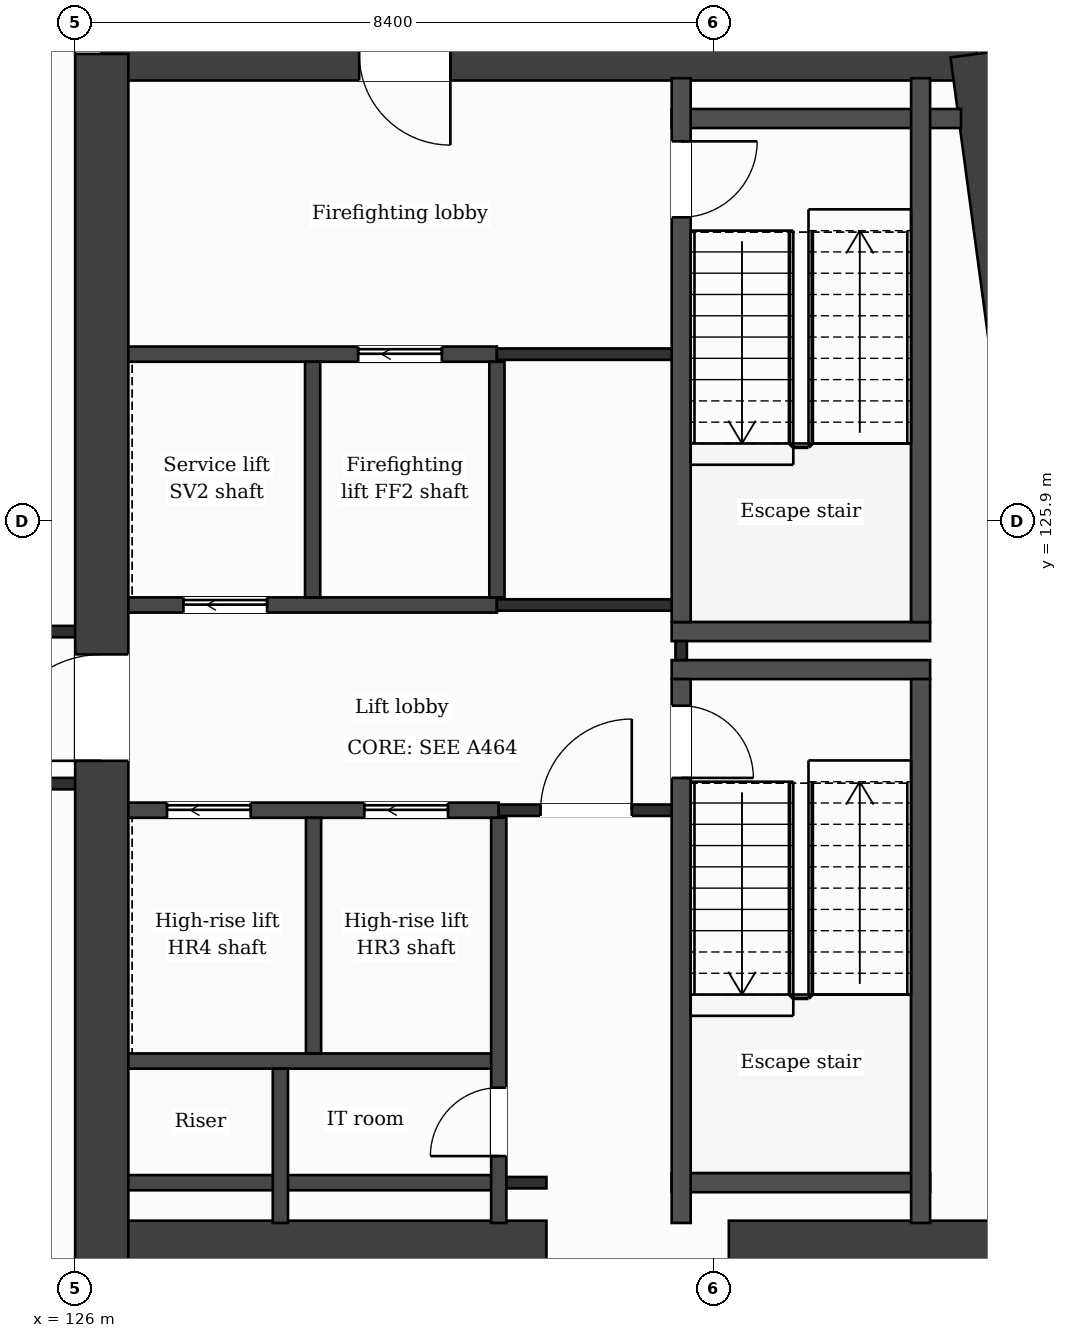
"""IFC4 building model, lengths in metres.
Left out: names, types, materials, properties, quantities, classifications, styles, units other than length and angle.
Written with IfcOpenShell. Run it as: python <this file> out.ifc"""

import sys

from ifc_helpers import new_model, si_unit, direction, frame, frame_2d, origin, place, context, subcontext, project, spatial, rectangle, extrude, element, fill, save


model = new_model("IFC4")
c1 = context("Model", 3, precision=1e-05, world=origin(), true_north=direction((0.0, 1.0)))
c2 = subcontext(c1, "Body", "Model", "MODEL_VIEW")
j1 = project(units=[si_unit("LENGTHUNIT", "METRE"), si_unit("PLANEANGLEUNIT", "RADIAN")], contexts=[c1])
p1 = place(None, origin())
s1 = spatial("IfcSite", under=j1, at=p1, CompositionType="ELEMENT")
p2 = place(p1, origin())
s2 = spatial("IfcBuilding", under=s1, at=p2, CompositionType="ELEMENT")
p3 = place(p2, frame((0.0, 0.0, 262.7)))
s3 = spatial("IfcBuildingStorey", under=s2, at=p3, CompositionType="ELEMENT", Elevation=262.7)
p4 = place(p3, frame((126.35, 132.05, 0.0), z_axis=(0.0, 0.0, 1.0), x_axis=(1.0, 0.0, 0.0)))
e1 = element("IfcWall", 1, at=p4, inside=s3, PredefinedType="SHEAR", context=c2, shape_type="SweptSolid", body=[
    extrude(rectangle(XDim=11.513, YDim=0.7, at=frame_2d((5.757, 0.0))), origin(), (0.0, 0.0, 1.0), 3.7),
])
p5 = place(p4, frame((3.386, 0.0, 0.0)))
e2 = element("IfcOpeningElement", 2, at=p5, cuts=e1, PredefinedType="OPENING", context=c2, shape_type="SweptSolid", body=[
    extrude(rectangle(XDim=1.2, YDim=2.1, at=frame_2d((0.6, 1.05))), frame((0.0, 0.36, 0.0), z_axis=(0.0, -1.0, 0.0), x_axis=(1.0, 0.0, 0.0)), (0.0, 0.0, 1.0), 0.72),
])
p6 = place(p3, frame((137.863, 132.05, 0.0), z_axis=(0.0, 0.0, 1.0), x_axis=(0.133406218907, -0.991061441464, 0.0)))
e3 = element("IfcWall", 3, at=p6, inside=s3, PredefinedType="SHEAR", context=c2, shape_type="SweptSolid", body=[
    extrude(rectangle(XDim=21.492, YDim=0.7, at=frame_2d((10.746, 0.0))), origin(), (0.0, 0.0, 1.0), 3.7),
])
p7 = place(p3, frame((126.35, 110.75, 0.0), z_axis=(0.0, 0.0, 1.0), x_axis=(0.0, 1.0, 0.0)))
e4 = element("IfcWall", 4, at=p7, inside=s3, PredefinedType="SHEAR", context=c2, shape_type="SweptSolid", body=[
    extrude(rectangle(XDim=21.3, YDim=0.7, at=frame_2d((10.65, 0.0))), origin(), (0.0, 0.0, 1.0), 3.7),
])
p8 = place(p7, frame((12.0, 0.0, 0.0)))
e5 = element("IfcOpeningElement", 5, at=p8, cuts=e4, PredefinedType="OPENING", context=c2, shape_type="SweptSolid", body=[
    extrude(rectangle(XDim=1.4, YDim=2.1, at=frame_2d((0.7, 1.05))), frame((0.0, 0.36, 0.0), z_axis=(0.0, -1.0, 0.0), x_axis=(1.0, 0.0, 0.0)), (0.0, 0.0, 1.0), 0.72),
])
p9 = place(p3, frame((126.7, 116.35, 0.0), z_axis=(0.0, 0.0, 1.0), x_axis=(1.0, 0.0, 0.0)))
e6 = element("IfcWall", 6, at=p9, inside=s3, PredefinedType="SHEAR", context=c2, shape_type="SweptSolid", body=[
    extrude(rectangle(XDim=5.5, YDim=0.7, at=frame_2d((2.75, 0.0))), origin(), (0.0, 0.0, 1.0), 3.7),
])
p10 = place(p3, frame((134.6, 116.35, 0.0), z_axis=(0.0, 0.0, 1.0), x_axis=(1.0, 0.0, 0.0)))
e7 = element("IfcWall", 7, at=p10, inside=s3, PredefinedType="SHEAR", context=c2, shape_type="SweptSolid", body=[
    extrude(rectangle(XDim=5.077, YDim=0.7, at=frame_2d((2.539, 0.0))), origin(), (0.0, 0.0, 1.0), 3.7),
])
p11 = place(p3, frame((126.7, 117.2, 0.0), z_axis=(0.0, 0.0, 1.0), x_axis=(1.0, 0.0, 0.0)))
e8 = element("IfcWall", 8, at=p11, inside=s3, PredefinedType="PARTITIONING", context=c2, shape_type="SweptSolid", body=[
    extrude(rectangle(XDim=4.873, YDim=0.2, at=frame_2d((2.437, 0.0))), origin(), (0.0, 0.0, 1.0), 3.38),
])
p12 = place(p3, frame((131.573, 117.2, 0.0), z_axis=(0.0, 0.0, 1.0), x_axis=(1.0, 0.0, 0.0)))
e9 = element("IfcWall", 9, at=p12, inside=s3, PredefinedType="PARTITIONING", context=c2, shape_type="SweptSolid", body=[
    extrude(rectangle(XDim=0.627, YDim=0.15, at=frame_2d((0.313, 0.0))), origin(), (0.0, 0.0, 1.0), 3.38),
])
p13 = place(p3, frame((133.848, 117.2, 0.0), z_axis=(0.0, 0.0, 1.0), x_axis=(1.0, 0.0, 0.0)))
e10 = element("IfcWall", 10, at=p13, inside=s3, PredefinedType="PARTITIONING", context=c2, shape_type="SweptSolid", body=[
    extrude(rectangle(XDim=3.4, YDim=0.25, at=frame_2d((1.7, 0.0))), origin(), (0.0, 0.0, 1.0), 3.38),
])
p14 = place(p3, frame((126.7, 118.8, 0.0), z_axis=(0.0, 0.0, 1.0), x_axis=(1.0, 0.0, 0.0)))
e11 = element("IfcWall", 11, at=p14, inside=s3, PredefinedType="PARTITIONING", context=c2, shape_type="SweptSolid", body=[
    extrude(rectangle(XDim=4.873, YDim=0.2, at=frame_2d((2.437, 0.0))), origin(), (0.0, 0.0, 1.0), 3.38),
])
p15 = place(p3, frame((126.7, 122.1, 0.0), z_axis=(0.0, 0.0, 1.0), x_axis=(1.0, 0.0, 0.0)))
e12 = element("IfcWall", 12, at=p15, inside=s3, PredefinedType="PARTITIONING", context=c2, shape_type="SweptSolid", body=[
    extrude(rectangle(XDim=4.873, YDim=0.2, at=frame_2d((2.437, 0.0))), origin(), (0.0, 0.0, 1.0), 3.38),
])
p16 = place(p15, frame((3.105, 0.0, 0.0)))
e13 = element("IfcOpeningElement", 13, at=p16, cuts=e12, PredefinedType="OPENING", context=c2, shape_type="SweptSolid", body=[
    extrude(rectangle(XDim=1.1, YDim=2.1, at=frame_2d((0.55, 1.05))), frame((0.0, 0.11, 0.0), z_axis=(0.0, -1.0, 0.0), x_axis=(1.0, 0.0, 0.0)), (0.0, 0.0, 1.0), 0.22),
])
p17 = place(p15, frame((0.509, 0.0, 0.0)))
e14 = element("IfcOpeningElement", 14, at=p17, cuts=e12, PredefinedType="OPENING", context=c2, shape_type="SweptSolid", body=[
    extrude(rectangle(XDim=1.1, YDim=2.1, at=frame_2d((0.55, 1.05))), frame((0.0, 0.11, 0.0), z_axis=(0.0, -1.0, 0.0), x_axis=(1.0, 0.0, 0.0)), (0.0, 0.0, 1.0), 0.22),
])
p18 = place(p3, frame((131.573, 122.1, 0.0), z_axis=(0.0, 0.0, 1.0), x_axis=(1.0, 0.0, 0.0)))
e15 = element("IfcWall", 15, at=p18, inside=s3, PredefinedType="PARTITIONING", context=c2, shape_type="SweptSolid", body=[
    extrude(rectangle(XDim=2.4, YDim=0.15, at=frame_2d((1.2, 0.0))), origin(), (0.0, 0.0, 1.0), 3.38),
])
p19 = place(p18, frame((0.55, 0.0, 0.0)))
e16 = element("IfcOpeningElement", 16, at=p19, cuts=e15, PredefinedType="OPENING", context=c2, shape_type="SweptSolid", body=[
    extrude(rectangle(XDim=1.2, YDim=2.1, at=frame_2d((0.6, 1.05))), frame((0.0, 0.085, 0.0), z_axis=(0.0, -1.0, 0.0), x_axis=(1.0, 0.0, 0.0)), (0.0, 0.0, 1.0), 0.17),
])
p20 = place(p3, frame((100.8, 122.45, 0.0), z_axis=(0.0, 0.0, 1.0), x_axis=(1.0, 0.0, 0.0)))
e17 = element("IfcWall", 17, at=p20, inside=s3, PredefinedType="PARTITIONING", context=c2, shape_type="SweptSolid", body=[
    extrude(rectangle(XDim=25.2, YDim=0.15, at=frame_2d((12.6, 0.0))), origin(), (0.0, 0.0, 1.0), 3.38),
])
p21 = place(p20, frame((5.55, 0.0, 0.0)))
e18 = element("IfcOpeningElement", 18, at=p21, cuts=e17, PredefinedType="OPENING", context=c2, shape_type="SweptSolid", body=[
    extrude(rectangle(XDim=1.0, YDim=2.1, at=frame_2d((0.5, 1.05))), frame((0.0, 0.085, 0.0), z_axis=(0.0, -1.0, 0.0), x_axis=(1.0, 0.0, 0.0)), (0.0, 0.0, 1.0), 0.17),
])
p22 = place(p20, frame((8.65, 0.0, 0.0)))
e19 = element("IfcOpeningElement", 19, at=p22, cuts=e17, PredefinedType="OPENING", context=c2, shape_type="SweptSolid", body=[
    extrude(rectangle(XDim=1.0, YDim=2.1, at=frame_2d((0.5, 1.05))), frame((0.0, 0.085, 0.0), z_axis=(0.0, -1.0, 0.0), x_axis=(1.0, 0.0, 0.0)), (0.0, 0.0, 1.0), 0.17),
])
p23 = place(p20, frame((19.83, 0.0, 0.0)))
e20 = element("IfcOpeningElement", 20, at=p23, cuts=e17, PredefinedType="OPENING", context=c2, shape_type="SweptSolid", body=[
    extrude(rectangle(XDim=1.0, YDim=2.1, at=frame_2d((0.5, 1.05))), frame((0.0, 0.085, 0.0), z_axis=(0.0, -1.0, 0.0), x_axis=(1.0, 0.0, 0.0)), (0.0, 0.0, 1.0), 0.17),
])
for number, where, z_axis, x_axis in (
    (21, (133.848, 123.95, 0.0), (0.0, 0.0, 1.0), (1.0, 0.0, 0.0)),
    (22, (133.848, 124.45, 0.0), (0.0, 0.0, 1.0), (1.0, 0.0, 0.0)),
):
    element("IfcWall", number, at=place(p3, frame(where, z_axis=z_axis, x_axis=x_axis)), inside=s3, PredefinedType="PARTITIONING", context=c2, shape_type="SweptSolid", body=[
        extrude(rectangle(XDim=3.4, YDim=0.25, at=frame_2d((1.7, 0.0))), origin(), (0.0, 0.0, 1.0), 3.38),
    ])
p24 = place(p3, frame((100.8, 124.45, 0.0), z_axis=(0.0, 0.0, 1.0), x_axis=(1.0, 0.0, 0.0)))
e23 = element("IfcWall", 23, at=p24, inside=s3, PredefinedType="PARTITIONING", context=c2, shape_type="SweptSolid", body=[
    extrude(rectangle(XDim=25.2, YDim=0.15, at=frame_2d((12.6, 0.0))), origin(), (0.0, 0.0, 1.0), 3.38),
])
p25 = place(p24, frame((0.975, 0.0, 0.0)))
e24 = element("IfcOpeningElement", 24, at=p25, cuts=e23, PredefinedType="OPENING", context=c2, shape_type="SweptSolid", body=[
    extrude(rectangle(XDim=1.0, YDim=2.1, at=frame_2d((0.5, 1.05))), frame((0.0, 0.085, 0.0), z_axis=(0.0, -1.0, 0.0), x_axis=(1.0, 0.0, 0.0)), (0.0, 0.0, 1.0), 0.17),
])
p26 = place(p24, frame((5.175, 0.0, 0.0)))
e25 = element("IfcOpeningElement", 25, at=p26, cuts=e23, PredefinedType="OPENING", context=c2, shape_type="SweptSolid", body=[
    extrude(rectangle(XDim=1.0, YDim=2.1, at=frame_2d((0.5, 1.05))), frame((0.0, 0.085, 0.0), z_axis=(0.0, -1.0, 0.0), x_axis=(1.0, 0.0, 0.0)), (0.0, 0.0, 1.0), 0.17),
])
p27 = place(p24, frame((13.775, 0.0, 0.0)))
e26 = element("IfcOpeningElement", 26, at=p27, cuts=e23, PredefinedType="OPENING", context=c2, shape_type="SweptSolid", body=[
    extrude(rectangle(XDim=1.0, YDim=2.1, at=frame_2d((0.5, 1.05))), frame((0.0, 0.085, 0.0), z_axis=(0.0, -1.0, 0.0), x_axis=(1.0, 0.0, 0.0)), (0.0, 0.0, 1.0), 0.17),
])
p28 = place(p24, frame((17.67, 0.0, 0.0)))
e27 = element("IfcOpeningElement", 27, at=p28, cuts=e23, PredefinedType="OPENING", context=c2, shape_type="SweptSolid", body=[
    extrude(rectangle(XDim=1.0, YDim=2.1, at=frame_2d((0.5, 1.05))), frame((0.0, 0.085, 0.0), z_axis=(0.0, -1.0, 0.0), x_axis=(1.0, 0.0, 0.0)), (0.0, 0.0, 1.0), 0.17),
])
p29 = place(p24, frame((23.225, 0.0, 0.0)))
e28 = element("IfcOpeningElement", 28, at=p29, cuts=e23, PredefinedType="OPENING", context=c2, shape_type="SweptSolid", body=[
    extrude(rectangle(XDim=1.0, YDim=2.1, at=frame_2d((0.5, 1.05))), frame((0.0, 0.085, 0.0), z_axis=(0.0, -1.0, 0.0), x_axis=(1.0, 0.0, 0.0)), (0.0, 0.0, 1.0), 0.17),
])
p30 = place(p3, frame((126.7, 124.8, 0.0), z_axis=(0.0, 0.0, 1.0), x_axis=(1.0, 0.0, 0.0)))
e29 = element("IfcWall", 29, at=p30, inside=s3, PredefinedType="PARTITIONING", context=c2, shape_type="SweptSolid", body=[
    extrude(rectangle(XDim=4.849, YDim=0.2, at=frame_2d((2.424, 0.0))), origin(), (0.0, 0.0, 1.0), 3.38),
])
p31 = place(p30, frame((0.725, 0.0, 0.0)))
e30 = element("IfcOpeningElement", 30, at=p31, cuts=e29, PredefinedType="OPENING", context=c2, shape_type="SweptSolid", body=[
    extrude(rectangle(XDim=1.1, YDim=2.1, at=frame_2d((0.55, 1.05))), frame((0.0, 0.11, 0.0), z_axis=(0.0, -1.0, 0.0), x_axis=(1.0, 0.0, 0.0)), (0.0, 0.0, 1.0), 0.22),
])
p32 = place(p3, frame((131.549, 124.8, 0.0), z_axis=(0.0, 0.0, 1.0), x_axis=(1.0, 0.0, 0.0)))
e31 = element("IfcWall", 31, at=p32, inside=s3, PredefinedType="PARTITIONING", context=c2, shape_type="SweptSolid", body=[
    extrude(rectangle(XDim=2.549, YDim=0.15, at=frame_2d((1.275, 0.0))), origin(), (0.0, 0.0, 1.0), 3.38),
])
p33 = place(p3, frame((126.7, 128.1, 0.0), z_axis=(0.0, 0.0, 1.0), x_axis=(1.0, 0.0, 0.0)))
e32 = element("IfcWall", 32, at=p33, inside=s3, PredefinedType="PARTITIONING", context=c2, shape_type="SweptSolid", body=[
    extrude(rectangle(XDim=4.849, YDim=0.2, at=frame_2d((2.424, 0.0))), origin(), (0.0, 0.0, 1.0), 3.38),
])
p34 = place(p33, frame((3.024, 0.0, 0.0)))
e33 = element("IfcOpeningElement", 33, at=p34, cuts=e32, PredefinedType="OPENING", context=c2, shape_type="SweptSolid", body=[
    extrude(rectangle(XDim=1.1, YDim=2.1, at=frame_2d((0.55, 1.05))), frame((0.0, 0.11, 0.0), z_axis=(0.0, -1.0, 0.0), x_axis=(1.0, 0.0, 0.0)), (0.0, 0.0, 1.0), 0.22),
])
p35 = place(p3, frame((131.549, 128.1, 0.0), z_axis=(0.0, 0.0, 1.0), x_axis=(1.0, 0.0, 0.0)))
e34 = element("IfcWall", 34, at=p35, inside=s3, PredefinedType="PARTITIONING", context=c2, shape_type="SweptSolid", body=[
    extrude(rectangle(XDim=2.424, YDim=0.15, at=frame_2d((1.212, 0.0))), origin(), (0.0, 0.0, 1.0), 3.38),
])
p36 = place(p3, frame((133.848, 131.2, 0.0), z_axis=(0.0, 0.0, 1.0), x_axis=(1.0, 0.0, 0.0)))
e35 = element("IfcWall", 35, at=p36, inside=s3, PredefinedType="PARTITIONING", context=c2, shape_type="SweptSolid", body=[
    extrude(rectangle(XDim=3.807, YDim=0.25, at=frame_2d((1.903, 0.0))), origin(), (0.0, 0.0, 1.0), 3.38),
])
p37 = place(p3, frame((128.7, 116.67, 0.0), z_axis=(0.0, 0.0, 1.0), x_axis=(0.0, 1.0, 0.0)))
e36 = element("IfcWall", 36, at=p37, inside=s3, PredefinedType="PARTITIONING", context=c2, shape_type="SweptSolid", body=[
    extrude(rectangle(XDim=2.03, YDim=0.2, at=frame_2d((1.015, 0.0))), origin(), (0.0, 0.0, 1.0), 3.38),
])
for number, where, z_axis, x_axis in (
    (37, (129.124, 124.9, 0.0), (0.0, 0.0, 1.0), (0.0, 1.0, 0.0)),
    (38, (129.136, 118.9, 0.0), (0.0, 0.0, 1.0), (0.0, 1.0, 0.0)),
    (39, (131.549, 124.9, 0.0), (0.0, 0.0, 1.0), (0.0, 1.0, 0.0)),
):
    element("IfcWall", number, at=place(p3, frame(where, z_axis=z_axis, x_axis=x_axis)), inside=s3, PredefinedType="PARTITIONING", context=c2, shape_type="SweptSolid", body=[
        extrude(rectangle(XDim=3.1, YDim=0.2, at=frame_2d((1.55, 0.0))), origin(), (0.0, 0.0, 1.0), 3.38),
    ])
p38 = place(p3, frame((131.573, 116.67, 0.0), z_axis=(0.0, 0.0, 1.0), x_axis=(0.0, 1.0, 0.0)))
e40 = element("IfcWall", 40, at=p38, inside=s3, PredefinedType="PARTITIONING", context=c2, shape_type="SweptSolid", body=[
    extrude(rectangle(XDim=5.33, YDim=0.2, at=frame_2d((2.665, 0.0))), origin(), (0.0, 0.0, 1.0), 3.38),
])
p39 = place(p38, frame((0.88, 0.0, 0.0)))
e41 = element("IfcOpeningElement", 41, at=p39, cuts=e40, PredefinedType="OPENING", context=c2, shape_type="SweptSolid", body=[
    extrude(rectangle(XDim=0.9, YDim=2.1, at=frame_2d((0.45, 1.05))), frame((0.0, 0.11, 0.0), z_axis=(0.0, -1.0, 0.0), x_axis=(1.0, 0.0, 0.0)), (0.0, 0.0, 1.0), 0.22),
])
p40 = place(p3, frame((133.973, 124.075, 0.0), z_axis=(0.0, 0.0, 1.0), x_axis=(0.0, 1.0, 0.0)))
e42 = element("IfcWall", 42, at=p40, inside=s3, PredefinedType="PARTITIONING", context=c2, shape_type="SweptSolid", body=[
    extrude(rectangle(XDim=0.25, YDim=0.15, at=frame_2d((0.125, 0.0))), origin(), (0.0, 0.0, 1.0), 3.38),
])
p41 = place(p3, frame((133.973, 116.67, 0.0), z_axis=(0.0, 0.0, 1.0), x_axis=(0.0, 1.0, 0.0)))
e43 = element("IfcWall", 43, at=p41, inside=s3, PredefinedType="PARTITIONING", context=c2, shape_type="SweptSolid", body=[
    extrude(rectangle(XDim=7.155, YDim=0.25, at=frame_2d((3.578, 0.0))), origin(), (0.0, 0.0, 1.0), 3.38),
])
p42 = place(p41, frame((5.855, 0.0, 0.0)))
e44 = element("IfcOpeningElement", 44, at=p42, cuts=e43, PredefinedType="OPENING", context=c2, shape_type="SweptSolid", body=[
    extrude(rectangle(XDim=0.95, YDim=2.1, at=frame_2d((0.475, 1.05))), frame((0.0, 0.135, 0.0), z_axis=(0.0, -1.0, 0.0), x_axis=(1.0, 0.0, 0.0)), (0.0, 0.0, 1.0), 0.27),
])
p43 = place(p3, frame((133.973, 124.575, 0.0), z_axis=(0.0, 0.0, 1.0), x_axis=(0.0, 1.0, 0.0)))
e45 = element("IfcWall", 45, at=p43, inside=s3, PredefinedType="PARTITIONING", context=c2, shape_type="SweptSolid", body=[
    extrude(rectangle(XDim=7.155, YDim=0.25, at=frame_2d((3.578, 0.0))), origin(), (0.0, 0.0, 1.0), 3.38),
])
p44 = place(p43, frame((5.325, 0.0, 0.0)))
e46 = element("IfcOpeningElement", 46, at=p44, cuts=e45, PredefinedType="OPENING", context=c2, shape_type="SweptSolid", body=[
    extrude(rectangle(XDim=1.0, YDim=2.1, at=frame_2d((0.5, 1.05))), frame((0.0, 0.135, 0.0), z_axis=(0.0, -1.0, 0.0), x_axis=(1.0, 0.0, 0.0)), (0.0, 0.0, 1.0), 0.27),
])
for number, where, z_axis, x_axis in (
    (47, (137.123, 116.67, 0.0), (0.0, 0.0, 1.0), (0.0, 1.0, 0.0)),
    (48, (137.123, 124.575, 0.0), (0.0, 0.0, 1.0), (0.0, 1.0, 0.0)),
):
    element("IfcWall", number, at=place(p3, frame(where, z_axis=z_axis, x_axis=x_axis)), inside=s3, PredefinedType="PARTITIONING", context=c2, shape_type="SweptSolid", body=[
        extrude(rectangle(XDim=7.155, YDim=0.25, at=frame_2d((3.578, 0.0))), origin(), (0.0, 0.0, 1.0), 3.38),
    ])
p45 = place(p19, origin())
e49 = element("IfcDoor", 49, at=p45, inside=s3, OperationType="SINGLE_SWING_RIGHT", PredefinedType="DOOR", context=c2, shape_type="SweptSolid", body=[
    extrude(rectangle(XDim=1.2, YDim=2.1, at=frame_2d((0.6, 1.05))), frame((0.0, 0.025, 0.0), z_axis=(0.0, -1.0, 0.0), x_axis=(1.0, 0.0, 0.0)), (0.0, 0.0, 1.0), 0.05),
])
fill(e16, e49)
p46 = place(p16, origin())
e50 = element("IfcDoor", 50, at=p46, inside=s3, OperationType="SLIDING_TO_LEFT", PredefinedType="DOOR", context=c2, shape_type="SweptSolid", body=[
    extrude(rectangle(XDim=1.1, YDim=2.1, at=frame_2d((0.55, 1.05))), frame((0.0, 0.025, 0.0), z_axis=(0.0, -1.0, 0.0), x_axis=(1.0, 0.0, 0.0)), (0.0, 0.0, 1.0), 0.05),
])
fill(e13, e50)
p47 = place(p17, origin())
e51 = element("IfcDoor", 51, at=p47, inside=s3, OperationType="SLIDING_TO_LEFT", PredefinedType="DOOR", context=c2, shape_type="SweptSolid", body=[
    extrude(rectangle(XDim=1.1, YDim=2.1, at=frame_2d((0.55, 1.05))), frame((0.0, 0.025, 0.0), z_axis=(0.0, -1.0, 0.0), x_axis=(1.0, 0.0, 0.0)), (0.0, 0.0, 1.0), 0.05),
])
fill(e14, e51)
p48 = place(p34, origin())
e52 = element("IfcDoor", 52, at=p48, inside=s3, OperationType="SLIDING_TO_LEFT", PredefinedType="DOOR", context=c2, shape_type="SweptSolid", body=[
    extrude(rectangle(XDim=1.1, YDim=2.1, at=frame_2d((0.55, 1.05))), frame((0.0, 0.025, 0.0), z_axis=(0.0, -1.0, 0.0), x_axis=(1.0, 0.0, 0.0)), (0.0, 0.0, 1.0), 0.05),
])
fill(e33, e52)
p49 = place(p31, origin())
e53 = element("IfcDoor", 53, at=p49, inside=s3, OperationType="SLIDING_TO_LEFT", PredefinedType="DOOR", context=c2, shape_type="SweptSolid", body=[
    extrude(rectangle(XDim=1.1, YDim=2.1, at=frame_2d((0.55, 1.05))), frame((0.0, 0.025, 0.0), z_axis=(0.0, -1.0, 0.0), x_axis=(1.0, 0.0, 0.0)), (0.0, 0.0, 1.0), 0.05),
])
fill(e30, e53)
p50 = place(p42, origin())
e54 = element("IfcDoor", 54, at=p50, inside=s3, OperationType="SINGLE_SWING_LEFT", PredefinedType="DOOR", context=c2, shape_type="SweptSolid", body=[
    extrude(rectangle(XDim=0.95, YDim=2.1, at=frame_2d((0.475, 1.05))), frame((0.0, 0.025, 0.0), z_axis=(0.0, -1.0, 0.0), x_axis=(1.0, 0.0, 0.0)), (0.0, 0.0, 1.0), 0.05),
])
fill(e44, e54)
p51 = place(p44, origin())
e55 = element("IfcDoor", 55, at=p51, inside=s3, OperationType="SINGLE_SWING_RIGHT", PredefinedType="DOOR", context=c2, shape_type="SweptSolid", body=[
    extrude(rectangle(XDim=1.0, YDim=2.1, at=frame_2d((0.5, 1.05))), frame((0.0, 0.025, 0.0), z_axis=(0.0, -1.0, 0.0), x_axis=(1.0, 0.0, 0.0)), (0.0, 0.0, 1.0), 0.05),
])
fill(e46, e55)
p52 = place(p39, origin())
e56 = element("IfcDoor", 56, at=p52, inside=s3, OperationType="SINGLE_SWING_LEFT", PredefinedType="DOOR", context=c2, shape_type="SweptSolid", body=[
    extrude(rectangle(XDim=0.9, YDim=2.1, at=frame_2d((0.45, 1.05))), frame((0.0, 0.025, 0.0), z_axis=(0.0, -1.0, 0.0), x_axis=(1.0, 0.0, 0.0)), (0.0, 0.0, 1.0), 0.05),
])
fill(e41, e56)
p53 = place(p5, origin())
e57 = element("IfcDoor", 57, at=p53, inside=s3, OperationType="SINGLE_SWING_RIGHT", PredefinedType="DOOR", context=c2, shape_type="SweptSolid", body=[
    extrude(rectangle(XDim=1.2, YDim=2.1, at=frame_2d((0.6, 1.05))), frame((0.0, 0.025, 0.0), z_axis=(0.0, -1.0, 0.0), x_axis=(1.0, 0.0, 0.0)), (0.0, 0.0, 1.0), 0.05),
])
fill(e2, e57)
p54 = place(p8, origin())
e58 = element("IfcDoor", 58, at=p54, inside=s3, OperationType="SINGLE_SWING_LEFT", PredefinedType="DOOR", context=c2, shape_type="SweptSolid", body=[
    extrude(rectangle(XDim=1.4, YDim=2.1, at=frame_2d((0.7, 1.05))), frame((0.0, 0.025, 0.0), z_axis=(0.0, -1.0, 0.0), x_axis=(1.0, 0.0, 0.0)), (0.0, 0.0, 1.0), 0.05),
])
fill(e5, e58)
save(model, sys.argv[1])
